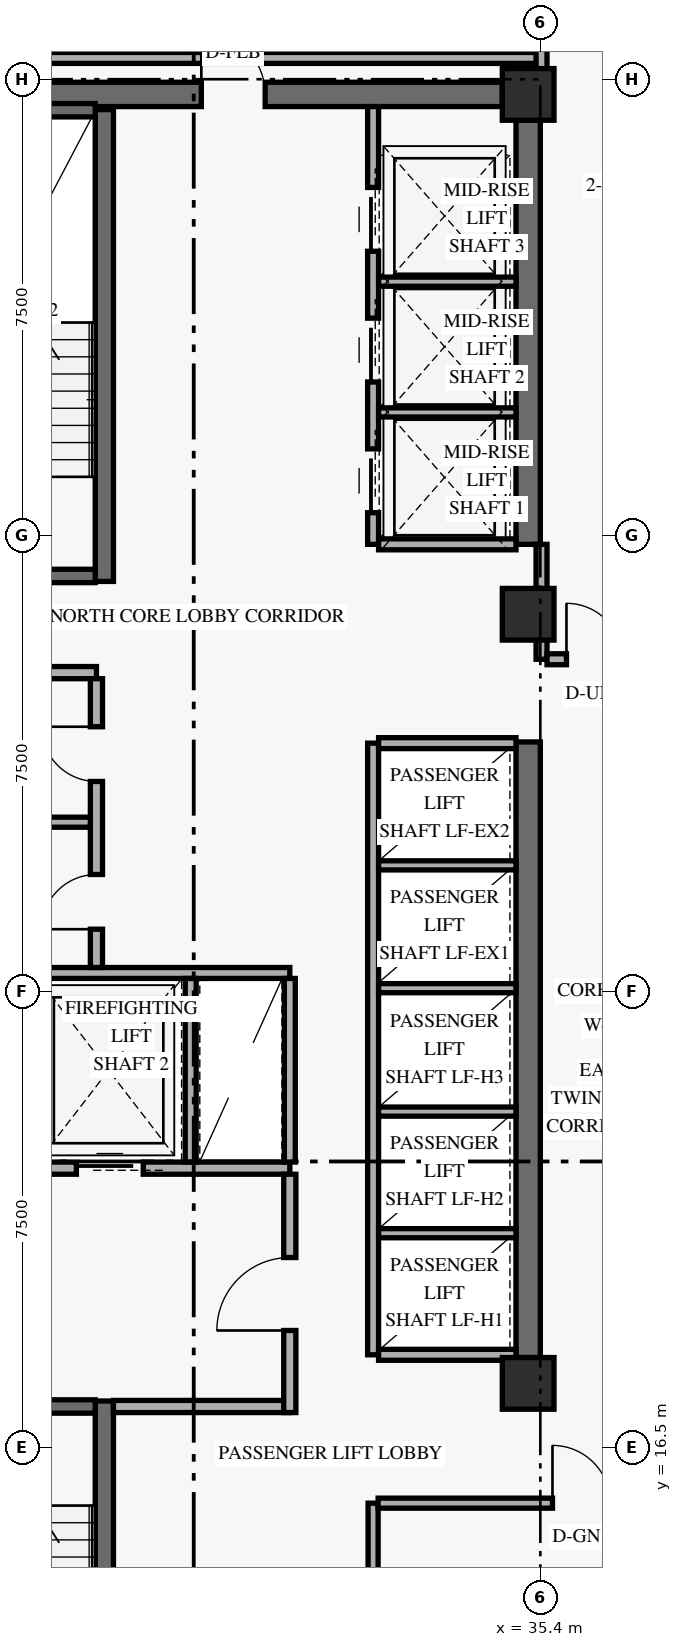
"""IFC4 building model, lengths in metres.
Left out: names, types, materials, properties, quantities, classifications, styles, units other than length and angle.
Written with IfcOpenShell. Run it as: python <this file> out.ifc"""

import sys

from ifc_helpers import new_model, si_unit, direction, frame, frame_2d, origin, origin_2d, place, context, subcontext, project, spatial, rectangle, extrude, element, fill, save


model = new_model("IFC4")
c1 = context("Model", 3, precision=1e-05, world=origin(), true_north=direction((0.0, 1.0)))
c2 = subcontext(c1, "Body", "Model", "MODEL_VIEW")
j1 = project(units=[si_unit("LENGTHUNIT", "METRE"), si_unit("PLANEANGLEUNIT", "RADIAN")], contexts=[c1])
p1 = place(None, origin())
s1 = spatial("IfcSite", under=j1, at=p1, CompositionType="ELEMENT")
p2 = place(p1, origin())
s2 = spatial("IfcBuilding", under=s1, at=p2, CompositionType="ELEMENT")
p3 = place(p2, frame((0.0, 0.0, 121.2)))
s3 = spatial("IfcBuildingStorey", under=s2, at=p3, CompositionType="ELEMENT", Elevation=121.2)
p4 = place(p3, frame((35.2, 17.975, 0.0), z_axis=(0.0, 0.0, 1.0), x_axis=(0.0, 1.0, 0.0)))
e1 = element("IfcWall", 1, at=p4, inside=s3, PredefinedType="SHEAR", context=c2, shape_type="SweptSolid", body=[
    extrude(rectangle(XDim=10.125, YDim=0.4, at=frame_2d((5.062, 0.0))), origin(), (0.0, 0.0, 1.0), 2.749),
])
p5 = place(p3, frame((35.2, 31.35, 0.0), z_axis=(0.0, 0.0, 1.0), x_axis=(0.0, 1.0, 0.0)))
e2 = element("IfcWall", 2, at=p5, inside=s3, PredefinedType="SHEAR", context=c2, shape_type="SweptSolid", body=[
    extrude(rectangle(XDim=6.975, YDim=0.4, at=frame_2d((3.487, 0.0))), origin(), (0.0, 0.0, 1.0), 2.749),
])
p6 = place(p3, frame((24.625, 38.75, 0.0), z_axis=(0.0, 0.0, 1.0), x_axis=(1.0, 0.0, 0.0)))
e3 = element("IfcWall", 3, at=p6, inside=s3, PredefinedType="SHEAR", context=c2, shape_type="SweptSolid", body=[
    extrude(rectangle(XDim=10.15, YDim=0.4, at=frame_2d((5.075, 0.0))), origin(), (0.0, 0.0, 1.0), 3.36),
])
p7 = place(p6, frame((5.2, 0.0, 0.0)))
e4 = element("IfcOpeningElement", 4, at=p7, cuts=e3, PredefinedType="OPENING", context=c2, shape_type="SweptSolid", body=[
    extrude(rectangle(XDim=1.05, YDim=2.15, at=frame_2d((0.525, 1.075))), frame((0.0, 0.21, 0.0), z_axis=(0.0, -1.0, 0.0), x_axis=(1.0, 0.0, 0.0)), (0.0, 0.0, 1.0), 0.42),
])
p8 = place(p3, frame((28.23, 9.5, 0.0), z_axis=(0.0, 0.0, 1.0), x_axis=(0.0, 1.0, 0.0)))
e5 = element("IfcWall", 5, at=p8, inside=s3, PredefinedType="SHEAR", context=c2, shape_type="SweptSolid", body=[
    extrude(rectangle(XDim=7.76, YDim=0.3, at=frame_2d((3.88, 0.0))), origin(), (0.0, 0.0, 1.0), 3.36),
])
p9 = place(p3, frame((24.92, 17.17, 0.0), z_axis=(0.0, 0.0, 1.0), x_axis=(1.0, 0.0, 0.0)))
e6 = element("IfcWall", 6, at=p9, inside=s3, PredefinedType="SHEAR", context=c2, shape_type="SweptSolid", body=[
    extrude(rectangle(XDim=3.16, YDim=0.22, at=frame_2d((1.58, 0.0))), origin(), (0.0, 0.0, 1.0), 3.36),
])
p10 = place(p9, frame((0.78, 0.0, 0.0)))
e7 = element("IfcOpeningElement", 7, at=p10, cuts=e6, PredefinedType="OPENING", context=c2, shape_type="SweptSolid", body=[
    extrude(rectangle(XDim=1.05, YDim=2.15, at=frame_2d((0.525, 1.075))), frame((0.0, 0.12, 0.0), z_axis=(0.0, -1.0, 0.0), x_axis=(1.0, 0.0, 0.0)), (0.0, 0.0, 1.0), 0.24),
])
p11 = place(p3, frame((28.23, 30.74, 0.0), z_axis=(0.0, 0.0, 1.0), x_axis=(0.0, 1.0, 0.0)))
e8 = element("IfcWall", 8, at=p11, inside=s3, PredefinedType="SHEAR", context=c2, shape_type="SweptSolid", body=[
    extrude(rectangle(XDim=7.76, YDim=0.3, at=frame_2d((3.88, 0.0))), origin(), (0.0, 0.0, 1.0), 3.36),
])
p12 = place(p3, frame((24.92, 30.83, 0.0), z_axis=(0.0, 0.0, 1.0), x_axis=(1.0, 0.0, 0.0)))
e9 = element("IfcWall", 9, at=p12, inside=s3, PredefinedType="SHEAR", context=c2, shape_type="SweptSolid", body=[
    extrude(rectangle(XDim=3.16, YDim=0.22, at=frame_2d((1.58, 0.0))), origin(), (0.0, 0.0, 1.0), 3.36),
])
p13 = place(p12, frame((0.78, 0.0, 0.0)))
e10 = element("IfcOpeningElement", 10, at=p13, cuts=e9, PredefinedType="OPENING", context=c2, shape_type="SweptSolid", body=[
    extrude(rectangle(XDim=1.05, YDim=2.15, at=frame_2d((0.525, 1.075))), frame((0.0, 0.12, 0.0), z_axis=(0.0, -1.0, 0.0), x_axis=(1.0, 0.0, 0.0)), (0.0, 0.0, 1.0), 0.24),
])
p14 = place(p3, frame((24.92, 38.49, 0.0), z_axis=(0.0, 0.0, 1.0), x_axis=(1.0, 0.0, 0.0)))
e11 = element("IfcWall", 11, at=p14, inside=s3, PredefinedType="SHEAR", context=c2, shape_type="SweptSolid", body=[
    extrude(rectangle(XDim=3.16, YDim=0.22, at=frame_2d((1.58, 0.0))), origin(), (0.0, 0.0, 1.0), 3.36),
])
for number, where, z_axis, x_axis in (
    (12, (35.2, 17.55, 0.0), (0.0, 0.0, 1.0), (1.0, 0.0, 0.0)),
    (13, (35.2, 30.2, 0.0), (0.0, 0.0, 1.0), (1.0, 0.0, 0.0)),
    (14, (35.2, 38.75, 0.0), (0.0, 0.0, 1.0), (1.0, 0.0, 0.0)),
):
    element("IfcColumn", number, at=place(p3, frame(where, z_axis=z_axis, x_axis=x_axis)), inside=s3, PredefinedType="COLUMN", context=c2, shape_type="SweptSolid", body=[
        extrude(rectangle(XDim=0.85, YDim=0.85, at=origin_2d()), origin(), (0.0, 0.0, 1.0), 3.6),
    ])
p15 = place(p3, frame((24.45, 21.09, 0.0), z_axis=(0.0, 0.0, 1.0), x_axis=(1.0, 0.0, 0.0)))
e15 = element("IfcWall", 15, at=p15, inside=s3, PredefinedType="STANDARD", context=c2, shape_type="SweptSolid", body=[
    extrude(rectangle(XDim=6.83, YDim=0.2, at=frame_2d((3.415, 0.0))), origin(), (0.0, 0.0, 1.0), 3.36),
])
p16 = place(p15, frame((0.72, 0.0, 0.0)))
e16 = element("IfcOpeningElement", 16, at=p16, cuts=e15, PredefinedType="OPENING", context=c2, shape_type="SweptSolid", body=[
    extrude(rectangle(XDim=1.1, YDim=2.2, at=frame_2d((0.55, 1.1))), frame((0.0, 0.11, 0.0), z_axis=(0.0, -1.0, 0.0), x_axis=(1.0, 0.0, 0.0)), (0.0, 0.0, 1.0), 0.22),
])
p17 = place(p15, frame((3.32, 0.0, 0.0)))
e17 = element("IfcOpeningElement", 17, at=p17, cuts=e15, PredefinedType="OPENING", context=c2, shape_type="SweptSolid", body=[
    extrude(rectangle(XDim=1.1, YDim=2.2, at=frame_2d((0.55, 1.1))), frame((0.0, 0.11, 0.0), z_axis=(0.0, -1.0, 0.0), x_axis=(1.0, 0.0, 0.0)), (0.0, 0.0, 1.0), 0.22),
])
p18 = place(p3, frame((28.38, 17.17, 0.0), z_axis=(0.0, 0.0, 1.0), x_axis=(1.0, 0.0, 0.0)))
e18 = element("IfcWall", 18, at=p18, inside=s3, PredefinedType="STANDARD", context=c2, shape_type="SweptSolid", body=[
    extrude(rectangle(XDim=2.9, YDim=0.2, at=frame_2d((1.45, 0.0))), origin(), (0.0, 0.0, 1.0), 3.36),
])
p19 = place(p3, frame((31.28, 17.07, 0.0), z_axis=(0.0, 0.0, 1.0), x_axis=(0.0, 1.0, 0.0)))
e19 = element("IfcWall", 19, at=p19, inside=s3, PredefinedType="STANDARD", context=c2, shape_type="SweptSolid", body=[
    extrude(rectangle(XDim=3.92, YDim=0.2, at=frame_2d((1.96, 0.0))), origin(), (0.0, 0.0, 1.0), 2.731),
])
p20 = place(p19, frame((1.35, 0.0, 0.0)))
e20 = element("IfcOpeningElement", 20, at=p20, cuts=e19, PredefinedType="OPENING", context=c2, shape_type="SweptSolid", body=[
    extrude(rectangle(XDim=1.2, YDim=2.15, at=frame_2d((0.6, 1.075))), frame((0.0, 0.11, 0.0), z_axis=(0.0, -1.0, 0.0), x_axis=(1.0, 0.0, 0.0)), (0.0, 0.0, 1.0), 0.22),
])
p21 = place(p3, frame((24.45, 24.3, 0.0), z_axis=(0.0, 0.0, 1.0), x_axis=(1.0, 0.0, 0.0)))
e21 = element("IfcWall", 21, at=p21, inside=s3, PredefinedType="STANDARD", context=c2, shape_type="SweptSolid", body=[
    extrude(rectangle(XDim=6.83, YDim=0.18, at=frame_2d((3.415, 0.0))), origin(), (0.0, 0.0, 1.0), 3.36),
])
for number, where, z_axis, x_axis in (
    (22, (29.65, 21.19, 0.0), (0.0, 0.0, 1.0), (0.0, 1.0, 0.0)),
    (23, (31.28, 21.19, 0.0), (0.0, 0.0, 1.0), (0.0, 1.0, 0.0)),
):
    element("IfcWall", number, at=place(p3, frame(where, z_axis=z_axis, x_axis=x_axis)), inside=s3, PredefinedType="STANDARD", context=c2, shape_type="SweptSolid", body=[
        extrude(rectangle(XDim=3.02, YDim=0.18, at=frame_2d((1.51, 0.0))), origin(), (0.0, 0.0, 1.0), 3.36),
    ])
p22 = place(p3, frame((24.45, 29.24, 0.0), z_axis=(0.0, 0.0, 1.0), x_axis=(1.0, 0.0, 0.0)))
e24 = element("IfcWall", 24, at=p22, inside=s3, PredefinedType="STANDARD", context=c2, shape_type="SweptSolid", body=[
    extrude(rectangle(XDim=3.65, YDim=0.2, at=frame_2d((1.825, 0.0))), origin(), (0.0, 0.0, 1.0), 3.36),
])
p23 = place(p3, frame((28.1, 24.39, 0.0), z_axis=(0.0, 0.0, 1.0), x_axis=(0.0, 1.0, 0.0)))
e25 = element("IfcWall", 25, at=p23, inside=s3, PredefinedType="STANDARD", context=c2, shape_type="SweptSolid", body=[
    extrude(rectangle(XDim=4.75, YDim=0.2, at=frame_2d((2.375, 0.0))), origin(), (0.0, 0.0, 1.0), 3.36),
])
p24 = place(p23, frame((0.63, 0.0, 0.0)))
e26 = element("IfcOpeningElement", 26, at=p24, cuts=e25, PredefinedType="OPENING", context=c2, shape_type="SweptSolid", body=[
    extrude(rectangle(XDim=0.9, YDim=2.1, at=frame_2d((0.45, 1.05))), frame((0.0, 0.11, 0.0), z_axis=(0.0, -1.0, 0.0), x_axis=(1.0, 0.0, 0.0)), (0.0, 0.0, 1.0), 0.22),
])
p25 = place(p23, frame((3.06, 0.0, 0.0)))
e27 = element("IfcOpeningElement", 27, at=p25, cuts=e25, PredefinedType="OPENING", context=c2, shape_type="SweptSolid", body=[
    extrude(rectangle(XDim=0.9, YDim=2.1, at=frame_2d((0.45, 1.05))), frame((0.0, 0.11, 0.0), z_axis=(0.0, -1.0, 0.0), x_axis=(1.0, 0.0, 0.0)), (0.0, 0.0, 1.0), 0.22),
])
p26 = place(p3, frame((24.45, 26.78, 0.0), z_axis=(0.0, 0.0, 1.0), x_axis=(1.0, 0.0, 0.0)))
e28 = element("IfcWall", 28, at=p26, inside=s3, PredefinedType="PARTITIONING", context=c2, shape_type="SweptSolid", body=[
    extrude(rectangle(XDim=3.55, YDim=0.165, at=frame_2d((1.775, 0.0))), origin(), (0.0, 0.0, 1.0), 3.36),
])
p27 = place(p3, frame((32.65, 18.02, 0.0), z_axis=(0.0, 0.0, 1.0), x_axis=(0.0, 1.0, 0.0)))
e29 = element("IfcWall", 29, at=p27, inside=s3, PredefinedType="STANDARD", context=c2, shape_type="SweptSolid", body=[
    extrude(rectangle(XDim=10.06, YDim=0.18, at=frame_2d((5.03, 0.0))), origin(), (0.0, 0.0, 1.0), 3.36),
])
for number, where, z_axis, x_axis in (
    (30, (32.74, 18.02, 0.0), (0.0, 0.0, 1.0), (1.0, 0.0, 0.0)),
    (31, (32.74, 28.08, 0.0), (0.0, 0.0, 1.0), (1.0, 0.0, 0.0)),
):
    element("IfcWall", number, at=place(p3, frame(where, z_axis=z_axis, x_axis=x_axis)), inside=s3, PredefinedType="STANDARD", context=c2, shape_type="SweptSolid", body=[
        extrude(rectangle(XDim=2.26, YDim=0.18, at=frame_2d((1.13, 0.0))), origin(), (0.0, 0.0, 1.0), 3.36),
    ])
for number, where, z_axis, x_axis in (
    (32, (32.74, 20.02, 0.0), (0.0, 0.0, 1.0), (1.0, 0.0, 0.0)),
    (33, (32.74, 22.02, 0.0), (0.0, 0.0, 1.0), (1.0, 0.0, 0.0)),
    (34, (32.74, 24.05, 0.0), (0.0, 0.0, 1.0), (1.0, 0.0, 0.0)),
    (35, (32.74, 26.07, 0.0), (0.0, 0.0, 1.0), (1.0, 0.0, 0.0)),
):
    element("IfcWall", number, at=place(p3, frame(where, z_axis=z_axis, x_axis=x_axis)), inside=s3, PredefinedType="STANDARD", context=c2, shape_type="SweptSolid", body=[
        extrude(rectangle(XDim=2.26, YDim=0.15, at=frame_2d((1.13, 0.0))), origin(), (0.0, 0.0, 1.0), 3.36),
    ])
p28 = place(p3, frame((32.65, 31.35, 0.0), z_axis=(0.0, 0.0, 1.0), x_axis=(0.0, 1.0, 0.0)))
e36 = element("IfcWall", 36, at=p28, inside=s3, PredefinedType="STANDARD", context=c2, shape_type="SweptSolid", body=[
    extrude(rectangle(XDim=7.2, YDim=0.18, at=frame_2d((3.6, 0.0))), origin(), (0.0, 0.0, 1.0), 3.36),
])
p29 = place(p28, frame((0.52, 0.0, 0.0)))
e37 = element("IfcOpeningElement", 37, at=p29, cuts=e36, PredefinedType="OPENING", context=c2, shape_type="SweptSolid", body=[
    extrude(rectangle(XDim=1.05, YDim=2.2, at=frame_2d((0.525, 1.1))), frame((0.0, 0.1, 0.0), z_axis=(0.0, -1.0, 0.0), x_axis=(1.0, 0.0, 0.0)), (0.0, 0.0, 1.0), 0.2),
])
p30 = place(p28, frame((2.67, 0.0, 0.0)))
e38 = element("IfcOpeningElement", 38, at=p30, cuts=e36, PredefinedType="OPENING", context=c2, shape_type="SweptSolid", body=[
    extrude(rectangle(XDim=1.05, YDim=2.2, at=frame_2d((0.525, 1.1))), frame((0.0, 0.1, 0.0), z_axis=(0.0, -1.0, 0.0), x_axis=(1.0, 0.0, 0.0)), (0.0, 0.0, 1.0), 0.2),
])
p31 = place(p28, frame((4.82, 0.0, 0.0)))
e39 = element("IfcOpeningElement", 39, at=p31, cuts=e36, PredefinedType="OPENING", context=c2, shape_type="SweptSolid", body=[
    extrude(rectangle(XDim=1.05, YDim=2.2, at=frame_2d((0.525, 1.1))), frame((0.0, 0.1, 0.0), z_axis=(0.0, -1.0, 0.0), x_axis=(1.0, 0.0, 0.0)), (0.0, 0.0, 1.0), 0.2),
])
p32 = place(p3, frame((32.74, 31.35, 0.0), z_axis=(0.0, 0.0, 1.0), x_axis=(1.0, 0.0, 0.0)))
e40 = element("IfcWall", 40, at=p32, inside=s3, PredefinedType="STANDARD", context=c2, shape_type="SweptSolid", body=[
    extrude(rectangle(XDim=2.26, YDim=0.18, at=frame_2d((1.13, 0.0))), origin(), (0.0, 0.0, 1.0), 3.36),
])
for number, where, z_axis, x_axis in (
    (41, (32.74, 33.52, 0.0), (0.0, 0.0, 1.0), (1.0, 0.0, 0.0)),
    (42, (32.74, 35.67, 0.0), (0.0, 0.0, 1.0), (1.0, 0.0, 0.0)),
):
    element("IfcWall", number, at=place(p3, frame(where, z_axis=z_axis, x_axis=x_axis)), inside=s3, PredefinedType="STANDARD", context=c2, shape_type="SweptSolid", body=[
        extrude(rectangle(XDim=2.26, YDim=0.15, at=frame_2d((1.13, 0.0))), origin(), (0.0, 0.0, 1.0), 3.36),
    ])
p33 = place(p3, frame((32.65, 9.5, 0.0), z_axis=(0.0, 0.0, 1.0), x_axis=(0.0, 1.0, 0.0)))
e43 = element("IfcWall", 43, at=p33, inside=s3, PredefinedType="PARTITIONING", context=c2, shape_type="SweptSolid", body=[
    extrude(rectangle(XDim=6.08, YDim=0.165, at=frame_2d((3.04, 0.0))), origin(), (0.0, 0.0, 1.0), 3.36),
])
p34 = place(p3, frame((32.732, 15.58, 0.0), z_axis=(0.0, 0.0, 1.0), x_axis=(1.0, 0.0, 0.0)))
e44 = element("IfcWall", 44, at=p34, inside=s3, PredefinedType="PARTITIONING", context=c2, shape_type="SweptSolid", body=[
    extrude(rectangle(XDim=5.618, YDim=0.165, at=frame_2d((2.809, 0.0))), origin(), (0.0, 0.0, 1.0), 2.731),
])
p35 = place(p34, frame((2.867, 0.0, 0.0)))
e45 = element("IfcOpeningElement", 45, at=p35, cuts=e44, PredefinedType="OPENING", context=c2, shape_type="SweptSolid", body=[
    extrude(rectangle(XDim=0.95, YDim=2.15, at=frame_2d((0.475, 1.075))), frame((0.0, 0.093, 0.0), z_axis=(0.0, -1.0, 0.0), x_axis=(1.0, 0.0, 0.0)), (0.0, 0.0, 1.0), 0.185),
])
p36 = place(p3, frame((35.42, 29.46, 0.0), z_axis=(0.0, 0.0, 1.0), x_axis=(0.0, 1.0, 0.0)))
e46 = element("IfcWall", 46, at=p36, inside=s3, PredefinedType="STANDARD", context=c2, shape_type="SweptSolid", body=[
    extrude(rectangle(XDim=1.89, YDim=0.18, at=frame_2d((0.945, 0.0))), origin(), (0.0, 0.0, 1.0), 2.731),
])
p37 = place(p3, frame((35.51, 29.46, 0.0), z_axis=(0.0, 0.0, 1.0), x_axis=(1.0, 0.0, 0.0)))
e47 = element("IfcWall", 47, at=p37, inside=s3, PredefinedType="STANDARD", context=c2, shape_type="SweptSolid", body=[
    extrude(rectangle(XDim=11.49, YDim=0.18, at=frame_2d((5.745, 0.0))), origin(), (0.0, 0.0, 1.0), 2.731),
])
p38 = place(p37, frame((0.32, 0.0, 0.0)))
e48 = element("IfcOpeningElement", 48, at=p38, cuts=e47, PredefinedType="OPENING", context=c2, shape_type="SweptSolid", body=[
    extrude(rectangle(XDim=0.92, YDim=2.15, at=frame_2d((0.46, 1.075))), frame((0.0, 0.1, 0.0), z_axis=(0.0, -1.0, 0.0), x_axis=(1.0, 0.0, 0.0)), (0.0, 0.0, 1.0), 0.2),
])
p39 = place(p3, frame((23.85, 39.35, 0.0), z_axis=(0.0, 0.0, 1.0), x_axis=(1.0, 0.0, 0.0)))
e49 = element("IfcWall", 49, at=p39, inside=s3, PredefinedType="STANDARD", context=c2, shape_type="SweptSolid", body=[
    extrude(rectangle(XDim=11.57, YDim=0.18, at=frame_2d((5.785, 0.0))), origin(), (0.0, 0.0, 1.0), 2.731),
])
p40 = place(p3, frame((35.42, 38.75, 0.0), z_axis=(0.0, 0.0, 1.0), x_axis=(0.0, 1.0, 0.0)))
e50 = element("IfcWall", 50, at=p40, inside=s3, PredefinedType="PARTITIONING", context=c2, shape_type="SweptSolid", body=[
    extrude(rectangle(XDim=6.27, YDim=0.18, at=frame_2d((3.135, 0.0))), origin(), (0.0, 0.0, 1.0), 2.731),
])
p41 = place(p17, origin())
e51 = element("IfcDoor", 51, at=p41, inside=s3, OperationType="SLIDING_TO_LEFT", PredefinedType="DOOR", context=c2, shape_type="SweptSolid", body=[
    extrude(rectangle(XDim=1.1, YDim=2.2, at=frame_2d((0.55, 1.1))), frame((0.0, 0.025, 0.0), z_axis=(0.0, -1.0, 0.0), x_axis=(1.0, 0.0, 0.0)), (0.0, 0.0, 1.0), 0.05),
])
fill(e17, e51)
p42 = place(p20, origin())
e52 = element("IfcDoor", 52, at=p42, inside=s3, OperationType="SINGLE_SWING_LEFT", PredefinedType="DOOR", context=c2, shape_type="SweptSolid", body=[
    extrude(rectangle(XDim=1.2, YDim=2.15, at=frame_2d((0.6, 1.075))), frame((0.0, 0.025, 0.0), z_axis=(0.0, -1.0, 0.0), x_axis=(1.0, 0.0, 0.0)), (0.0, 0.0, 1.0), 0.05),
])
fill(e20, e52)
p43 = place(p24, origin())
e53 = element("IfcDoor", 53, at=p43, inside=s3, OperationType="SINGLE_SWING_LEFT", PredefinedType="DOOR", context=c2, shape_type="SweptSolid", body=[
    extrude(rectangle(XDim=0.9, YDim=2.1, at=frame_2d((0.45, 1.05))), frame((0.0, 0.025, 0.0), z_axis=(0.0, -1.0, 0.0), x_axis=(1.0, 0.0, 0.0)), (0.0, 0.0, 1.0), 0.05),
])
fill(e26, e53)
p44 = place(p25, origin())
e54 = element("IfcDoor", 54, at=p44, inside=s3, OperationType="SINGLE_SWING_RIGHT", PredefinedType="DOOR", context=c2, shape_type="SweptSolid", body=[
    extrude(rectangle(XDim=0.9, YDim=2.1, at=frame_2d((0.45, 1.05))), frame((0.0, 0.025, 0.0), z_axis=(0.0, -1.0, 0.0), x_axis=(1.0, 0.0, 0.0)), (0.0, 0.0, 1.0), 0.05),
])
fill(e27, e54)
p45 = place(p29, origin())
e55 = element("IfcDoor", 55, at=p45, inside=s3, OperationType="SLIDING_TO_LEFT", PredefinedType="DOOR", context=c2, shape_type="SweptSolid", body=[
    extrude(rectangle(XDim=1.05, YDim=2.2, at=frame_2d((0.525, 1.1))), frame((0.0, 0.025, 0.0), z_axis=(0.0, -1.0, 0.0), x_axis=(1.0, 0.0, 0.0)), (0.0, 0.0, 1.0), 0.05),
])
fill(e37, e55)
p46 = place(p30, origin())
e56 = element("IfcDoor", 56, at=p46, inside=s3, OperationType="SLIDING_TO_LEFT", PredefinedType="DOOR", context=c2, shape_type="SweptSolid", body=[
    extrude(rectangle(XDim=1.05, YDim=2.2, at=frame_2d((0.525, 1.1))), frame((0.0, 0.025, 0.0), z_axis=(0.0, -1.0, 0.0), x_axis=(1.0, 0.0, 0.0)), (0.0, 0.0, 1.0), 0.05),
])
fill(e38, e56)
p47 = place(p31, origin())
e57 = element("IfcDoor", 57, at=p47, inside=s3, OperationType="SLIDING_TO_LEFT", PredefinedType="DOOR", context=c2, shape_type="SweptSolid", body=[
    extrude(rectangle(XDim=1.05, YDim=2.2, at=frame_2d((0.525, 1.1))), frame((0.0, 0.025, 0.0), z_axis=(0.0, -1.0, 0.0), x_axis=(1.0, 0.0, 0.0)), (0.0, 0.0, 1.0), 0.05),
])
fill(e39, e57)
p48 = place(p35, origin())
e58 = element("IfcDoor", 58, at=p48, inside=s3, OperationType="SINGLE_SWING_LEFT", PredefinedType="DOOR", context=c2, shape_type="SweptSolid", body=[
    extrude(rectangle(XDim=0.95, YDim=2.15, at=frame_2d((0.475, 1.075))), frame((0.0, 0.025, 0.0), z_axis=(0.0, -1.0, 0.0), x_axis=(1.0, 0.0, 0.0)), (0.0, 0.0, 1.0), 0.05),
])
fill(e45, e58)
p49 = place(p7, frame((1.05, 0.0, 0.0), z_axis=(0.0, 0.0, 1.0), x_axis=(-1.0, 0.0, 0.0)))
e59 = element("IfcDoor", 59, at=p49, inside=s3, OperationType="SINGLE_SWING_RIGHT", PredefinedType="DOOR", context=c2, shape_type="SweptSolid", body=[
    extrude(rectangle(XDim=1.05, YDim=2.15, at=frame_2d((0.525, 1.075))), frame((0.0, 0.025, 0.0), z_axis=(0.0, -1.0, 0.0), x_axis=(1.0, 0.0, 0.0)), (0.0, 0.0, 1.0), 0.05),
])
fill(e4, e59)
p50 = place(p38, origin())
e60 = element("IfcDoor", 60, at=p50, inside=s3, OperationType="SINGLE_SWING_LEFT", PredefinedType="DOOR", context=c2, shape_type="SweptSolid", body=[
    extrude(rectangle(XDim=0.92, YDim=2.15, at=frame_2d((0.46, 1.075))), frame((0.0, 0.025, 0.0), z_axis=(0.0, -1.0, 0.0), x_axis=(1.0, 0.0, 0.0)), (0.0, 0.0, 1.0), 0.05),
])
fill(e48, e60)
save(model, sys.argv[1])
